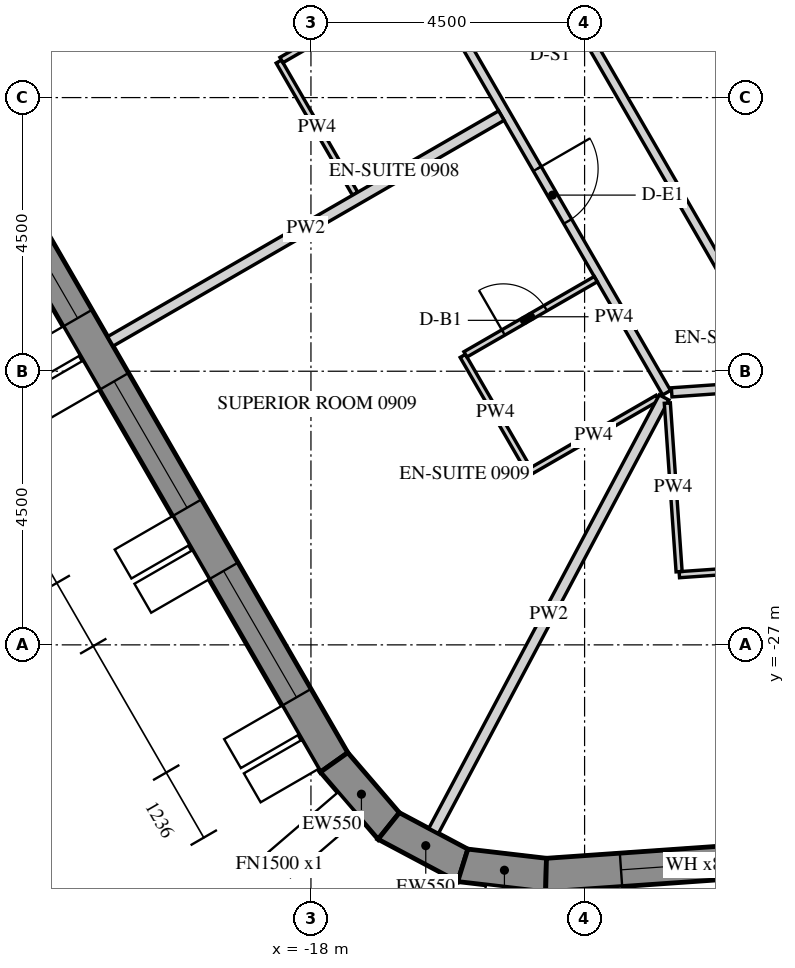
"""IFC4 building model, lengths in metres.
Left out: names, types, materials, properties, quantities, classifications, styles, units other than length and angle.
Written with IfcOpenShell. Run it as: python <this file> out.ifc"""

import sys

from ifc_helpers import new_model, si_unit, direction, frame, frame_2d, origin, place, context, subcontext, project, spatial, polyline, rectangle, outline, extrude, element, fill, save


model = new_model("IFC4")
c1 = context("Model", 3, precision=1e-05, world=origin(), true_north=direction((0.0, 1.0)))
c2 = subcontext(c1, "Body", "Model", "MODEL_VIEW")
j1 = project(units=[si_unit("LENGTHUNIT", "METRE"), si_unit("PLANEANGLEUNIT", "RADIAN")], contexts=[c1])
p1 = place(None, origin())
s1 = spatial("IfcSite", under=j1, at=p1, CompositionType="ELEMENT")
p2 = place(p1, origin())
s2 = spatial("IfcBuilding", under=s1, at=p2, CompositionType="ELEMENT")
p3 = place(p2, frame((0.0, 0.0, 123.3)))
s3 = spatial("IfcBuildingStorey", under=s2, at=p3, CompositionType="ELEMENT", Elevation=123.3)
p4 = place(p3, frame((-32.655, -2.89, -0.15), z_axis=(0.0, 0.0, 1.0), x_axis=(0.499997711317, -0.866026725152, 0.0)))
e1 = element("IfcWall", 1, at=p4, inside=s3, PredefinedType="SOLIDWALL", context=c2, shape_type="SweptSolid", body=[
    extrude(outline(polyline([(-0.022, -0.275), (30.097, -0.275), (30.045, 0.275), (0.022, 0.275), (-0.022, -0.275)])), origin(), (0.0, 0.0, 1.0), 3.9),
])
p5 = place(p4, frame((1.236, 0.0, 1.05)))
e2 = element("IfcOpeningElement", 2, at=p5, cuts=e1, PredefinedType="OPENING", context=c2, shape_type="SweptSolid", body=[
    extrude(rectangle(XDim=2.4, YDim=2.4, at=frame_2d((1.2, 1.2))), frame((0.0, 0.285, 0.0), z_axis=(0.0, -1.0, 0.0), x_axis=(1.0, 0.0, 0.0)), (0.0, 0.0, 1.0), 0.57),
])
p6 = place(p4, frame((4.835, 0.0, 1.05)))
e3 = element("IfcOpeningElement", 3, at=p6, cuts=e1, PredefinedType="OPENING", context=c2, shape_type="SweptSolid", body=[
    extrude(rectangle(XDim=2.4, YDim=2.4, at=frame_2d((1.2, 1.2))), frame((0.0, 0.285, 0.0), z_axis=(0.0, -1.0, 0.0), x_axis=(1.0, 0.0, 0.0)), (0.0, 0.0, 1.0), 0.57),
])
p7 = place(p4, frame((8.436, 0.0, 1.05)))
e4 = element("IfcOpeningElement", 4, at=p7, cuts=e1, PredefinedType="OPENING", context=c2, shape_type="SweptSolid", body=[
    extrude(rectangle(XDim=2.4, YDim=2.4, at=frame_2d((1.2, 1.2))), frame((0.0, 0.285, 0.0), z_axis=(0.0, -1.0, 0.0), x_axis=(1.0, 0.0, 0.0)), (0.0, 0.0, 1.0), 0.57),
])
p8 = place(p4, frame((12.035, 0.0, 1.05)))
e5 = element("IfcOpeningElement", 5, at=p8, cuts=e1, PredefinedType="OPENING", context=c2, shape_type="SweptSolid", body=[
    extrude(rectangle(XDim=2.4, YDim=2.4, at=frame_2d((1.2, 1.2))), frame((0.0, 0.285, 0.0), z_axis=(0.0, -1.0, 0.0), x_axis=(1.0, 0.0, 0.0)), (0.0, 0.0, 1.0), 0.57),
])
p9 = place(p4, frame((15.635, 0.0, 1.05)))
e6 = element("IfcOpeningElement", 6, at=p9, cuts=e1, PredefinedType="OPENING", context=c2, shape_type="SweptSolid", body=[
    extrude(rectangle(XDim=2.4, YDim=2.4, at=frame_2d((1.2, 1.2))), frame((0.0, 0.285, 0.0), z_axis=(0.0, -1.0, 0.0), x_axis=(1.0, 0.0, 0.0)), (0.0, 0.0, 1.0), 0.57),
])
p10 = place(p4, frame((19.236, 0.0, 1.05)))
e7 = element("IfcOpeningElement", 7, at=p10, cuts=e1, PredefinedType="OPENING", context=c2, shape_type="SweptSolid", body=[
    extrude(rectangle(XDim=2.4, YDim=2.4, at=frame_2d((1.2, 1.2))), frame((0.0, 0.285, 0.0), z_axis=(0.0, -1.0, 0.0), x_axis=(1.0, 0.0, 0.0)), (0.0, 0.0, 1.0), 0.57),
])
p11 = place(p4, frame((22.835, 0.0, 1.05)))
e8 = element("IfcOpeningElement", 8, at=p11, cuts=e1, PredefinedType="OPENING", context=c2, shape_type="SweptSolid", body=[
    extrude(rectangle(XDim=2.4, YDim=2.4, at=frame_2d((1.2, 1.2))), frame((0.0, 0.285, 0.0), z_axis=(0.0, -1.0, 0.0), x_axis=(1.0, 0.0, 0.0)), (0.0, 0.0, 1.0), 0.57),
])
p12 = place(p4, frame((26.436, 0.0, 1.05)))
e9 = element("IfcOpeningElement", 9, at=p12, cuts=e1, PredefinedType="OPENING", context=c2, shape_type="SweptSolid", body=[
    extrude(rectangle(XDim=2.4, YDim=2.4, at=frame_2d((1.2, 1.2))), frame((0.0, 0.285, 0.0), z_axis=(0.0, -1.0, 0.0), x_axis=(1.0, 0.0, 0.0)), (0.0, 0.0, 1.0), 0.57),
])
p13 = place(p3, frame((-17.619, -28.932, -0.15), z_axis=(0.0, 0.0, 1.0), x_axis=(0.651621950847, -0.758543890078, 0.0)))
e10 = element("IfcWall", 10, at=p13, inside=s3, PredefinedType="SOLIDWALL", context=c2, shape_type="SweptSolid", body=[
    extrude(outline(polyline([(-0.026, -0.275), (1.431, -0.275), (1.327, 0.275), (0.026, 0.275), (-0.026, -0.275)])), origin(), (0.0, 0.0, 1.0), 3.9),
])
p14 = place(p3, frame((-16.721, -29.979, -0.15), z_axis=(0.0, 0.0, 1.0), x_axis=(0.882994189209, -0.469383917304, 0.0)))
e11 = element("IfcWall", 11, at=p14, inside=s3, PredefinedType="SOLIDWALL", context=c2, shape_type="SweptSolid", body=[
    extrude(outline(polyline([(-0.052, -0.275), (1.431, -0.275), (1.327, 0.275), (0.052, 0.275), (-0.052, -0.275)])), origin(), (0.0, 0.0, 1.0), 3.9),
])
p15 = place(p3, frame((-15.503, -30.626, -0.15), z_axis=(0.0, 0.0, 1.0), x_axis=(0.993232537394, -0.11614269956, 0.0)))
e12 = element("IfcWall", 12, at=p15, inside=s3, PredefinedType="SOLIDWALL", context=c2, shape_type="SweptSolid", body=[
    extrude(outline(polyline([(-0.052, -0.275), (1.405, -0.275), (1.353, 0.275), (0.052, 0.275), (-0.052, -0.275)])), origin(), (0.0, 0.0, 1.0), 3.9),
])
p16 = place(p3, frame((-14.134, -30.786, -0.15), z_axis=(0.0, 0.0, 1.0), x_axis=(0.997564037441, 0.069756657061, 0.0)))
e13 = element("IfcWall", 13, at=p16, inside=s3, PredefinedType="SOLIDWALL", context=c2, shape_type="SweptSolid", body=[
    extrude(outline(polyline([(-0.026, -0.275), (30.094, -0.275), (30.049, 0.275), (0.026, 0.275), (-0.026, -0.275)])), origin(), (0.0, 0.0, 1.0), 3.9),
])
p17 = place(p16, frame((1.236, 0.0, 1.05)))
e14 = element("IfcOpeningElement", 14, at=p17, cuts=e13, PredefinedType="OPENING", context=c2, shape_type="SweptSolid", body=[
    extrude(rectangle(XDim=2.4, YDim=2.4, at=frame_2d((1.2, 1.2))), frame((0.0, 0.285, 0.0), z_axis=(0.0, -1.0, 0.0), x_axis=(1.0, 0.0, 0.0)), (0.0, 0.0, 1.0), 0.57),
])
p18 = place(p16, frame((4.835, 0.0, 1.05)))
e15 = element("IfcOpeningElement", 15, at=p18, cuts=e13, PredefinedType="OPENING", context=c2, shape_type="SweptSolid", body=[
    extrude(rectangle(XDim=2.4, YDim=2.4, at=frame_2d((1.2, 1.2))), frame((0.0, 0.285, 0.0), z_axis=(0.0, -1.0, 0.0), x_axis=(1.0, 0.0, 0.0)), (0.0, 0.0, 1.0), 0.57),
])
p19 = place(p16, frame((8.436, 0.0, 1.05)))
e16 = element("IfcOpeningElement", 16, at=p19, cuts=e13, PredefinedType="OPENING", context=c2, shape_type="SweptSolid", body=[
    extrude(rectangle(XDim=2.4, YDim=2.4, at=frame_2d((1.2, 1.2))), frame((0.0, 0.285, 0.0), z_axis=(0.0, -1.0, 0.0), x_axis=(1.0, 0.0, 0.0)), (0.0, 0.0, 1.0), 0.57),
])
p20 = place(p16, frame((12.035, 0.0, 1.05)))
e17 = element("IfcOpeningElement", 17, at=p20, cuts=e13, PredefinedType="OPENING", context=c2, shape_type="SweptSolid", body=[
    extrude(rectangle(XDim=2.4, YDim=2.4, at=frame_2d((1.2, 1.2))), frame((0.0, 0.285, 0.0), z_axis=(0.0, -1.0, 0.0), x_axis=(1.0, 0.0, 0.0)), (0.0, 0.0, 1.0), 0.57),
])
p21 = place(p16, frame((15.635, 0.0, 1.05)))
e18 = element("IfcOpeningElement", 18, at=p21, cuts=e13, PredefinedType="OPENING", context=c2, shape_type="SweptSolid", body=[
    extrude(rectangle(XDim=2.4, YDim=2.4, at=frame_2d((1.2, 1.2))), frame((0.0, 0.285, 0.0), z_axis=(0.0, -1.0, 0.0), x_axis=(1.0, 0.0, 0.0)), (0.0, 0.0, 1.0), 0.57),
])
p22 = place(p16, frame((19.236, 0.0, 1.05)))
e19 = element("IfcOpeningElement", 19, at=p22, cuts=e13, PredefinedType="OPENING", context=c2, shape_type="SweptSolid", body=[
    extrude(rectangle(XDim=2.4, YDim=2.4, at=frame_2d((1.2, 1.2))), frame((0.0, 0.285, 0.0), z_axis=(0.0, -1.0, 0.0), x_axis=(1.0, 0.0, 0.0)), (0.0, 0.0, 1.0), 0.57),
])
p23 = place(p16, frame((22.835, 0.0, 1.05)))
e20 = element("IfcOpeningElement", 20, at=p23, cuts=e13, PredefinedType="OPENING", context=c2, shape_type="SweptSolid", body=[
    extrude(rectangle(XDim=2.4, YDim=2.4, at=frame_2d((1.2, 1.2))), frame((0.0, 0.285, 0.0), z_axis=(0.0, -1.0, 0.0), x_axis=(1.0, 0.0, 0.0)), (0.0, 0.0, 1.0), 0.57),
])
p24 = place(p16, frame((26.436, 0.0, 1.05)))
e21 = element("IfcOpeningElement", 21, at=p24, cuts=e13, PredefinedType="OPENING", context=c2, shape_type="SweptSolid", body=[
    extrude(rectangle(XDim=2.4, YDim=2.4, at=frame_2d((1.2, 1.2))), frame((0.0, 0.285, 0.0), z_axis=(0.0, -1.0, 0.0), x_axis=(1.0, 0.0, 0.0)), (0.0, 0.0, 1.0), 0.57),
])
p25 = place(p3, frame((-24.09, -2.175, 0.0), z_axis=(0.0, 0.0, 1.0), x_axis=(0.499996832073, -0.86602723278, 0.0)))
e22 = element("IfcWall", 22, at=p25, inside=s3, PredefinedType="PARTITIONING", context=c2, shape_type="SweptSolid", body=[
    extrude(rectangle(XDim=23.877, YDim=0.15, at=frame_2d((11.938, 0.0))), origin(), (0.0, 0.0, 1.0), 2.988),
])
p26 = place(p25, frame((6.343, 0.0, 0.0)))
e23 = element("IfcOpeningElement", 23, at=p26, cuts=e22, PredefinedType="OPENING", context=c2, shape_type="SweptSolid", body=[
    extrude(rectangle(XDim=1.0, YDim=2.1, at=frame_2d((0.5, 1.05))), frame((0.0, 0.085, 0.0), z_axis=(0.0, -1.0, 0.0), x_axis=(1.0, 0.0, 0.0)), (0.0, 0.0, 1.0), 0.17),
])
p27 = place(p25, frame((13.172, 0.0, 0.0)))
e24 = element("IfcOpeningElement", 24, at=p27, cuts=e22, PredefinedType="OPENING", context=c2, shape_type="SweptSolid", body=[
    extrude(rectangle(XDim=1.0, YDim=2.1, at=frame_2d((0.5, 1.05))), frame((0.0, 0.085, 0.0), z_axis=(0.0, -1.0, 0.0), x_axis=(1.0, 0.0, 0.0)), (0.0, 0.0, 1.0), 0.17),
])
p28 = place(p25, frame((19.625, 0.0, 0.0)))
e25 = element("IfcOpeningElement", 25, at=p28, cuts=e22, PredefinedType="OPENING", context=c2, shape_type="SweptSolid", body=[
    extrude(rectangle(XDim=1.0, YDim=2.1, at=frame_2d((0.5, 1.05))), frame((0.0, 0.085, 0.0), z_axis=(0.0, -1.0, 0.0), x_axis=(1.0, 0.0, 0.0)), (0.0, 0.0, 1.0), 0.17),
])
p29 = place(p3, frame((-12.068, -22.847, 0.0), z_axis=(0.0, 0.0, 1.0), x_axis=(0.99756437486, 0.069751831595, 0.0)))
e26 = element("IfcWall", 26, at=p29, inside=s3, PredefinedType="PARTITIONING", context=c2, shape_type="SweptSolid", body=[
    extrude(rectangle(XDim=22.002, YDim=0.15, at=frame_2d((11.001, 0.0))), origin(), (0.0, 0.0, 1.0), 2.988),
])
p30 = place(p29, frame((3.169, 0.0, 0.0)))
e27 = element("IfcOpeningElement", 27, at=p30, cuts=e26, PredefinedType="OPENING", context=c2, shape_type="SweptSolid", body=[
    extrude(rectangle(XDim=1.0, YDim=2.1, at=frame_2d((0.5, 1.05))), frame((0.0, 0.085, 0.0), z_axis=(0.0, -1.0, 0.0), x_axis=(1.0, 0.0, 0.0)), (0.0, 0.0, 1.0), 0.17),
])
p31 = place(p29, frame((13.121, 0.0, 0.0)))
e28 = element("IfcOpeningElement", 28, at=p31, cuts=e26, PredefinedType="OPENING", context=c2, shape_type="SweptSolid", body=[
    extrude(rectangle(XDim=1.0, YDim=2.1, at=frame_2d((0.5, 1.05))), frame((0.0, 0.085, 0.0), z_axis=(0.0, -1.0, 0.0), x_axis=(1.0, 0.0, 0.0)), (0.0, 0.0, 1.0), 0.17),
])
p32 = place(p29, frame((20.852, 0.0, 0.0)))
e29 = element("IfcOpeningElement", 29, at=p32, cuts=e26, PredefinedType="OPENING", context=c2, shape_type="SweptSolid", body=[
    extrude(rectangle(XDim=1.0, YDim=2.1, at=frame_2d((0.5, 1.05))), frame((0.0, 0.085, 0.0), z_axis=(0.0, -1.0, 0.0), x_axis=(1.0, 0.0, 0.0)), (0.0, 0.0, 1.0), 0.17),
])
p33 = place(p3, frame((-11.197, -20.907, 0.0), z_axis=(0.0, 0.0, 1.0), x_axis=(-0.500004557924, 0.86602277225, 0.0)))
e30 = element("IfcWall", 30, at=p33, inside=s3, PredefinedType="PARTITIONING", context=c2, shape_type="SweptSolid", body=[
    extrude(rectangle(XDim=11.487, YDim=0.15, at=frame_2d((5.743, 0.0))), origin(), (0.0, 0.0, 1.0), 2.988),
])
p34 = place(p33, frame((5.293, 0.0, 0.0)))
e31 = element("IfcOpeningElement", 31, at=p34, cuts=e30, PredefinedType="OPENING", context=c2, shape_type="SweptSolid", body=[
    extrude(rectangle(XDim=0.9, YDim=2.1, at=frame_2d((0.45, 1.05))), frame((0.0, 0.085, 0.0), z_axis=(0.0, -1.0, 0.0), x_axis=(1.0, 0.0, 0.0)), (0.0, 0.0, 1.0), 0.17),
])
p35 = place(p3, frame((-17.274, -19.581, 0.0), z_axis=(0.0, 0.0, 1.0), x_axis=(-0.499946979623, 0.86605601295, 0.0)))
e32 = element("IfcWall", 32, at=p35, inside=s3, PredefinedType="PARTITIONING", context=c2, shape_type="SweptSolid", body=[
    extrude(rectangle(XDim=2.51, YDim=0.1, at=frame_2d((1.255, 0.0))), origin(), (0.0, 0.0, 1.0), 2.988),
])
p36 = place(p3, frame((-18.485, -17.383, 0.0), z_axis=(0.0, 0.0, 1.0), x_axis=(0.866004723184, 0.50003581814, 0.0)))
e33 = element("IfcWall", 33, at=p36, inside=s3, PredefinedType="PARTITIONING", context=c2, shape_type="SweptSolid", body=[
    extrude(rectangle(XDim=2.675, YDim=0.1, at=frame_2d((1.337, 0.0))), origin(), (0.0, 0.0, 1.0), 2.988),
])
p37 = place(p36, frame((0.81, 0.0, 0.0)))
e34 = element("IfcOpeningElement", 34, at=p37, cuts=e33, PredefinedType="OPENING", context=c2, shape_type="SweptSolid", body=[
    extrude(rectangle(XDim=0.8, YDim=2.1, at=frame_2d((0.4, 1.05))), frame((0.0, 0.06, 0.0), z_axis=(0.0, -1.0, 0.0), x_axis=(1.0, 0.0, 0.0)), (0.0, 0.0, 1.0), 0.12),
])
p38 = place(p3, frame((-21.299, -22.009, 0.0), z_axis=(0.0, 0.0, 1.0), x_axis=(0.866014745021, 0.500018461065, 0.0)))
e35 = element("IfcWall", 35, at=p38, inside=s3, PredefinedType="PARTITIONING", context=c2, shape_type="SweptSolid", body=[
    extrude(rectangle(XDim=7.425, YDim=0.18, at=frame_2d((3.712, 0.0))), origin(), (0.0, 0.0, 1.0), 2.988),
])
p39 = place(p3, frame((-12.3, -22.939, 0.0), z_axis=(0.0, 0.0, 1.0), x_axis=(-0.866044985707, -0.499966081581, 0.0)))
e36 = element("IfcWall", 36, at=p39, inside=s3, PredefinedType="PARTITIONING", context=c2, shape_type="SweptSolid", body=[
    extrude(rectangle(XDim=2.429, YDim=0.1, at=frame_2d((1.214, 0.0))), origin(), (0.0, 0.0, 1.0), 2.988),
])
p40 = place(p3, frame((-14.428, -24.11, 0.0), z_axis=(0.0, 0.0, 1.0), x_axis=(-0.499961633463, 0.866047553582, 0.0)))
e37 = element("IfcWall", 37, at=p40, inside=s3, PredefinedType="PARTITIONING", context=c2, shape_type="SweptSolid", body=[
    extrude(rectangle(XDim=2.15, YDim=0.1, at=frame_2d((1.075, 0.0))), origin(), (0.0, 0.0, 1.0), 2.988),
])
p41 = place(p3, frame((-15.46, -22.223, 0.0), z_axis=(0.0, 0.0, 1.0), x_axis=(0.866031185235, 0.4999899861, 0.0)))
e38 = element("IfcWall", 38, at=p41, inside=s3, PredefinedType="PARTITIONING", context=c2, shape_type="SweptSolid", body=[
    extrude(rectangle(XDim=2.475, YDim=0.1, at=frame_2d((1.238, 0.0))), origin(), (0.0, 0.0, 1.0), 2.988),
])
p42 = place(p41, frame((0.72, 0.0, 0.0)))
e39 = element("IfcOpeningElement", 39, at=p42, cuts=e38, PredefinedType="OPENING", context=c2, shape_type="SweptSolid", body=[
    extrude(rectangle(XDim=0.8, YDim=2.1, at=frame_2d((0.4, 1.05))), frame((0.0, 0.06, 0.0), z_axis=(0.0, -1.0, 0.0), x_axis=(1.0, 0.0, 0.0)), (0.0, 0.0, 1.0), 0.12),
])
p43 = place(p3, frame((-15.983, -30.059, 0.0), z_axis=(0.0, 0.0, 1.0), x_axis=(0.469476547643, 0.882944942346, 0.0)))
e40 = element("IfcWall", 40, at=p43, inside=s3, PredefinedType="PARTITIONING", context=c2, shape_type="SweptSolid", body=[
    extrude(rectangle(XDim=8.073, YDim=0.18, at=frame_2d((4.037, 0.0))), origin(), (0.0, 0.0, 1.0), 2.988),
])
p44 = place(p3, frame((-9.797, -25.696, 0.0), z_axis=(0.0, 0.0, 1.0), x_axis=(-0.997566475845, -0.069721777595, 0.0)))
e41 = element("IfcWall", 41, at=p44, inside=s3, PredefinedType="PARTITIONING", context=c2, shape_type="SweptSolid", body=[
    extrude(rectangle(XDim=2.15, YDim=0.1, at=frame_2d((1.075, 0.0))), origin(), (0.0, 0.0, 1.0), 2.988),
])
p45 = place(p3, frame((-11.946, -25.796, 0.0), z_axis=(0.0, 0.0, 1.0), x_axis=(-0.069754817075, 0.997564166104, 0.0)))
e42 = element("IfcWall", 42, at=p45, inside=s3, PredefinedType="PARTITIONING", context=c2, shape_type="SweptSolid", body=[
    extrude(rectangle(XDim=2.779, YDim=0.1, at=frame_2d((1.39, 0.0))), origin(), (0.0, 0.0, 1.0), 2.988),
])
p46 = place(p10, frame((0.0, 0.205, 0.0)))
e43 = element("IfcWindow", 43, at=p46, inside=s3, PartitioningType="DOUBLE_PANEL_VERTICAL", PredefinedType="WINDOW", context=c2, shape_type="SweptSolid", body=[
    extrude(rectangle(XDim=2.4, YDim=2.4, at=frame_2d((1.2, 1.2))), frame((0.0, 0.03, 0.0), z_axis=(0.0, -1.0, 0.0), x_axis=(1.0, 0.0, 0.0)), (0.0, 0.0, 1.0), 0.06),
])
fill(e7, e43)
p47 = place(p11, frame((0.0, 0.205, 0.0)))
e44 = element("IfcWindow", 44, at=p47, inside=s3, PartitioningType="DOUBLE_PANEL_VERTICAL", PredefinedType="WINDOW", context=c2, shape_type="SweptSolid", body=[
    extrude(rectangle(XDim=2.4, YDim=2.4, at=frame_2d((1.2, 1.2))), frame((0.0, 0.03, 0.0), z_axis=(0.0, -1.0, 0.0), x_axis=(1.0, 0.0, 0.0)), (0.0, 0.0, 1.0), 0.06),
])
fill(e8, e44)
p48 = place(p12, frame((0.0, 0.205, 0.0)))
e45 = element("IfcWindow", 45, at=p48, inside=s3, PartitioningType="DOUBLE_PANEL_VERTICAL", PredefinedType="WINDOW", context=c2, shape_type="SweptSolid", body=[
    extrude(rectangle(XDim=2.4, YDim=2.4, at=frame_2d((1.2, 1.2))), frame((0.0, 0.03, 0.0), z_axis=(0.0, -1.0, 0.0), x_axis=(1.0, 0.0, 0.0)), (0.0, 0.0, 1.0), 0.06),
])
fill(e9, e45)
p49 = place(p17, frame((0.0, 0.205, 0.0)))
e46 = element("IfcWindow", 46, at=p49, inside=s3, PartitioningType="DOUBLE_PANEL_VERTICAL", PredefinedType="WINDOW", context=c2, shape_type="SweptSolid", body=[
    extrude(rectangle(XDim=2.4, YDim=2.4, at=frame_2d((1.2, 1.2))), frame((0.0, 0.03, 0.0), z_axis=(0.0, -1.0, 0.0), x_axis=(1.0, 0.0, 0.0)), (0.0, 0.0, 1.0), 0.06),
])
fill(e14, e46)
p50 = place(p28, origin())
e47 = element("IfcDoor", 47, at=p50, inside=s3, OperationType="SINGLE_SWING_RIGHT", PredefinedType="DOOR", context=c2, shape_type="SweptSolid", body=[
    extrude(rectangle(XDim=1.0, YDim=2.1, at=frame_2d((0.5, 1.05))), frame((0.0, 0.025, 0.0), z_axis=(0.0, -1.0, 0.0), x_axis=(1.0, 0.0, 0.0)), (0.0, 0.0, 1.0), 0.05),
])
fill(e25, e47)
p51 = place(p42, origin())
e48 = element("IfcDoor", 48, at=p51, inside=s3, OperationType="SINGLE_SWING_RIGHT", PredefinedType="DOOR", context=c2, shape_type="SweptSolid", body=[
    extrude(rectangle(XDim=0.8, YDim=2.1, at=frame_2d((0.4, 1.05))), frame((0.0, 0.025, 0.0), z_axis=(0.0, -1.0, 0.0), x_axis=(1.0, 0.0, 0.0)), (0.0, 0.0, 1.0), 0.05),
])
fill(e39, e48)
save(model, sys.argv[1])
